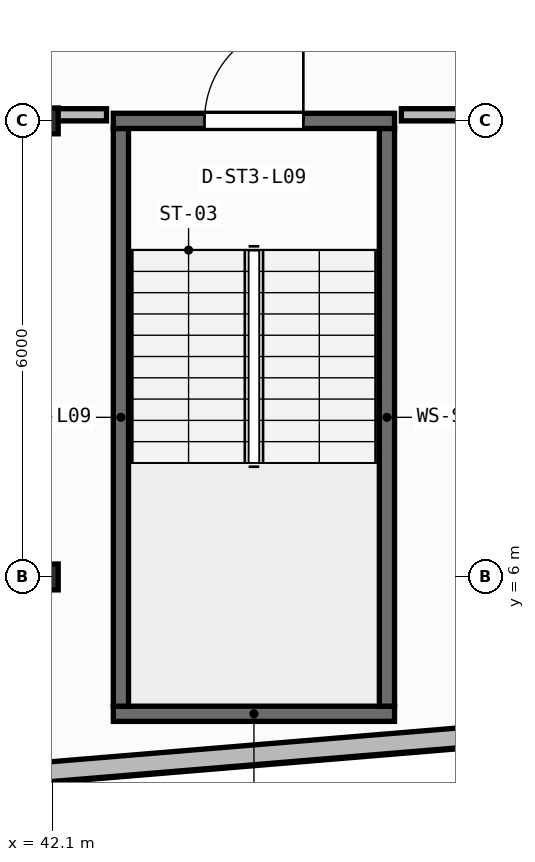
"""IFC4 building model, lengths in metres.
Left out: names, types, materials, properties, quantities, classifications, styles, units other than length and angle.
Written with IfcOpenShell. Run it as: python <this file> out.ifc"""

import sys

from ifc_helpers import new_model, si_unit, direction, frame, frame_2d, origin, origin_2d, place, context, subcontext, project, spatial, rectangle, i_section, extrude, element, fill, save


model = new_model("IFC4")
c1 = context("Model", 3, precision=1e-05, world=origin(), true_north=direction((0.0, 1.0)))
c2 = subcontext(c1, "Body", "Model", "MODEL_VIEW")
j1 = project(units=[si_unit("LENGTHUNIT", "METRE"), si_unit("PLANEANGLEUNIT", "RADIAN")], contexts=[c1])
p1 = place(None, origin())
s1 = spatial("IfcSite", under=j1, at=p1, CompositionType="ELEMENT")
p2 = place(p1, origin())
s2 = spatial("IfcBuilding", under=s1, at=p2, CompositionType="ELEMENT")
p3 = place(p2, frame((0.0, 0.0, 38.3)))
s3 = spatial("IfcBuildingStorey", under=s2, at=p3, CompositionType="ELEMENT", Elevation=38.3)
for number, where, z_axis, x_axis in (
    (1, (42.0, 6.0, 0.0), (0.0, 0.0, 1.0), (1.0, 0.0, 0.0)),
    (2, (42.0, 12.0, 0.0), (0.0, 0.0, 1.0), (1.0, 0.0, 0.0)),
):
    element("IfcColumn", number, at=place(p3, frame(where, z_axis=z_axis, x_axis=x_axis)), inside=s3, PredefinedType="COLUMN", context=c2, shape_type="SweptSolid", body=[
        extrude(i_section(OverallWidth=0.35, OverallDepth=0.34, WebThickness=0.016, FlangeThickness=0.028, at=origin_2d()), origin(), (0.0, 0.0, 1.0), 3.95),
    ])
p4 = place(p3, frame((2.76, 0.174, 0.0), z_axis=(0.0, 0.0, 1.0), x_axis=(0.996571478456, 0.082736257641, 0.0)))
e3 = element("IfcWall", 3, at=p4, inside=s3, PredefinedType="STANDARD", context=c2, shape_type="SweptSolid", body=[
    extrude(rectangle(XDim=52.861, YDim=0.26, at=frame_2d((26.431, 0.0))), origin(), (0.0, 0.0, 1.0), 3.71),
])
p5 = place(p4, frame((25.231, 0.0, 0.9)))
e4 = element("IfcOpeningElement", 4, at=p5, cuts=e3, PredefinedType="OPENING", context=c2, shape_type="SweptSolid", body=[
    extrude(rectangle(XDim=2.4, YDim=1.65, at=frame_2d((1.2, 0.825))), frame((0.0, 0.14, 0.0), z_axis=(0.0, -1.0, 0.0), x_axis=(1.0, 0.0, 0.0)), (0.0, 0.0, 1.0), 0.28),
])
p6 = place(p3, frame((42.9, 4.2, 0.0), z_axis=(0.0, 0.0, 1.0), x_axis=(1.0, 0.0, 0.0)))
e5 = element("IfcWall", 5, at=p6, inside=s3, PredefinedType="SHEAR", context=c2, shape_type="SweptSolid", body=[
    extrude(rectangle(XDim=3.7, YDim=0.2, at=frame_2d((1.85, 0.0))), origin(), (0.0, 0.0, 1.0), 3.71),
])
for number, where, z_axis, x_axis in (
    (6, (43.0, 4.3, 0.0), (0.0, 0.0, 1.0), (0.0, 1.0, 0.0)),
    (7, (46.5, 4.3, 0.0), (0.0, 0.0, 1.0), (0.0, 1.0, 0.0)),
):
    element("IfcWall", number, at=place(p3, frame(where, z_axis=z_axis, x_axis=x_axis)), inside=s3, PredefinedType="SHEAR", context=c2, shape_type="SweptSolid", body=[
        extrude(rectangle(XDim=7.6, YDim=0.2, at=frame_2d((3.8, 0.0))), origin(), (0.0, 0.0, 1.0), 3.71),
    ])
p7 = place(p3, frame((42.9, 12.0, 0.0), z_axis=(0.0, 0.0, 1.0), x_axis=(1.0, 0.0, 0.0)))
e8 = element("IfcWall", 8, at=p7, inside=s3, PredefinedType="SHEAR", context=c2, shape_type="SweptSolid", body=[
    extrude(rectangle(XDim=3.7, YDim=0.2, at=frame_2d((1.85, 0.0))), origin(), (0.0, 0.0, 1.0), 3.71),
])
p8 = place(p7, frame((1.2, 0.0, 0.0)))
e9 = element("IfcOpeningElement", 9, at=p8, cuts=e8, PredefinedType="OPENING", context=c2, shape_type="SweptSolid", body=[
    extrude(rectangle(XDim=1.3, YDim=2.15, at=frame_2d((0.65, 1.075))), frame((0.0, 0.11, 0.0), z_axis=(0.0, -1.0, 0.0), x_axis=(1.0, 0.0, 0.0)), (0.0, 0.0, 1.0), 0.22),
])
p9 = place(p3, frame((31.63, 12.08, 0.0), z_axis=(0.0, 0.0, 1.0), x_axis=(1.0, 0.0, 0.0)))
e10 = element("IfcWall", 10, at=p9, inside=s3, PredefinedType="PARTITIONING", context=c2, shape_type="SweptSolid", body=[
    extrude(rectangle(XDim=11.181, YDim=0.16, at=frame_2d((5.59, 0.0))), origin(), (0.0, 0.0, 1.0), 3.073),
])
p10 = place(p3, frame((46.689, 12.08, 0.0), z_axis=(0.0, 0.0, 1.0), x_axis=(1.0, 0.0, 0.0)))
e11 = element("IfcWall", 11, at=p10, inside=s3, PredefinedType="PARTITIONING", context=c2, shape_type="SweptSolid", body=[
    extrude(rectangle(XDim=3.011, YDim=0.16, at=frame_2d((1.505, 0.0))), origin(), (0.0, 0.0, 1.0), 3.073),
])
p11 = place(p8, origin())
e12 = element("IfcDoor", 12, at=p11, inside=s3, OperationType="SINGLE_SWING_RIGHT", PredefinedType="DOOR", context=c2, shape_type="SweptSolid", body=[
    extrude(rectangle(XDim=1.3, YDim=2.15, at=frame_2d((0.65, 1.075))), frame((0.0, 0.025, 0.0), z_axis=(0.0, -1.0, 0.0), x_axis=(1.0, 0.0, 0.0)), (0.0, 0.0, 1.0), 0.05),
])
fill(e9, e12)
save(model, sys.argv[1])
